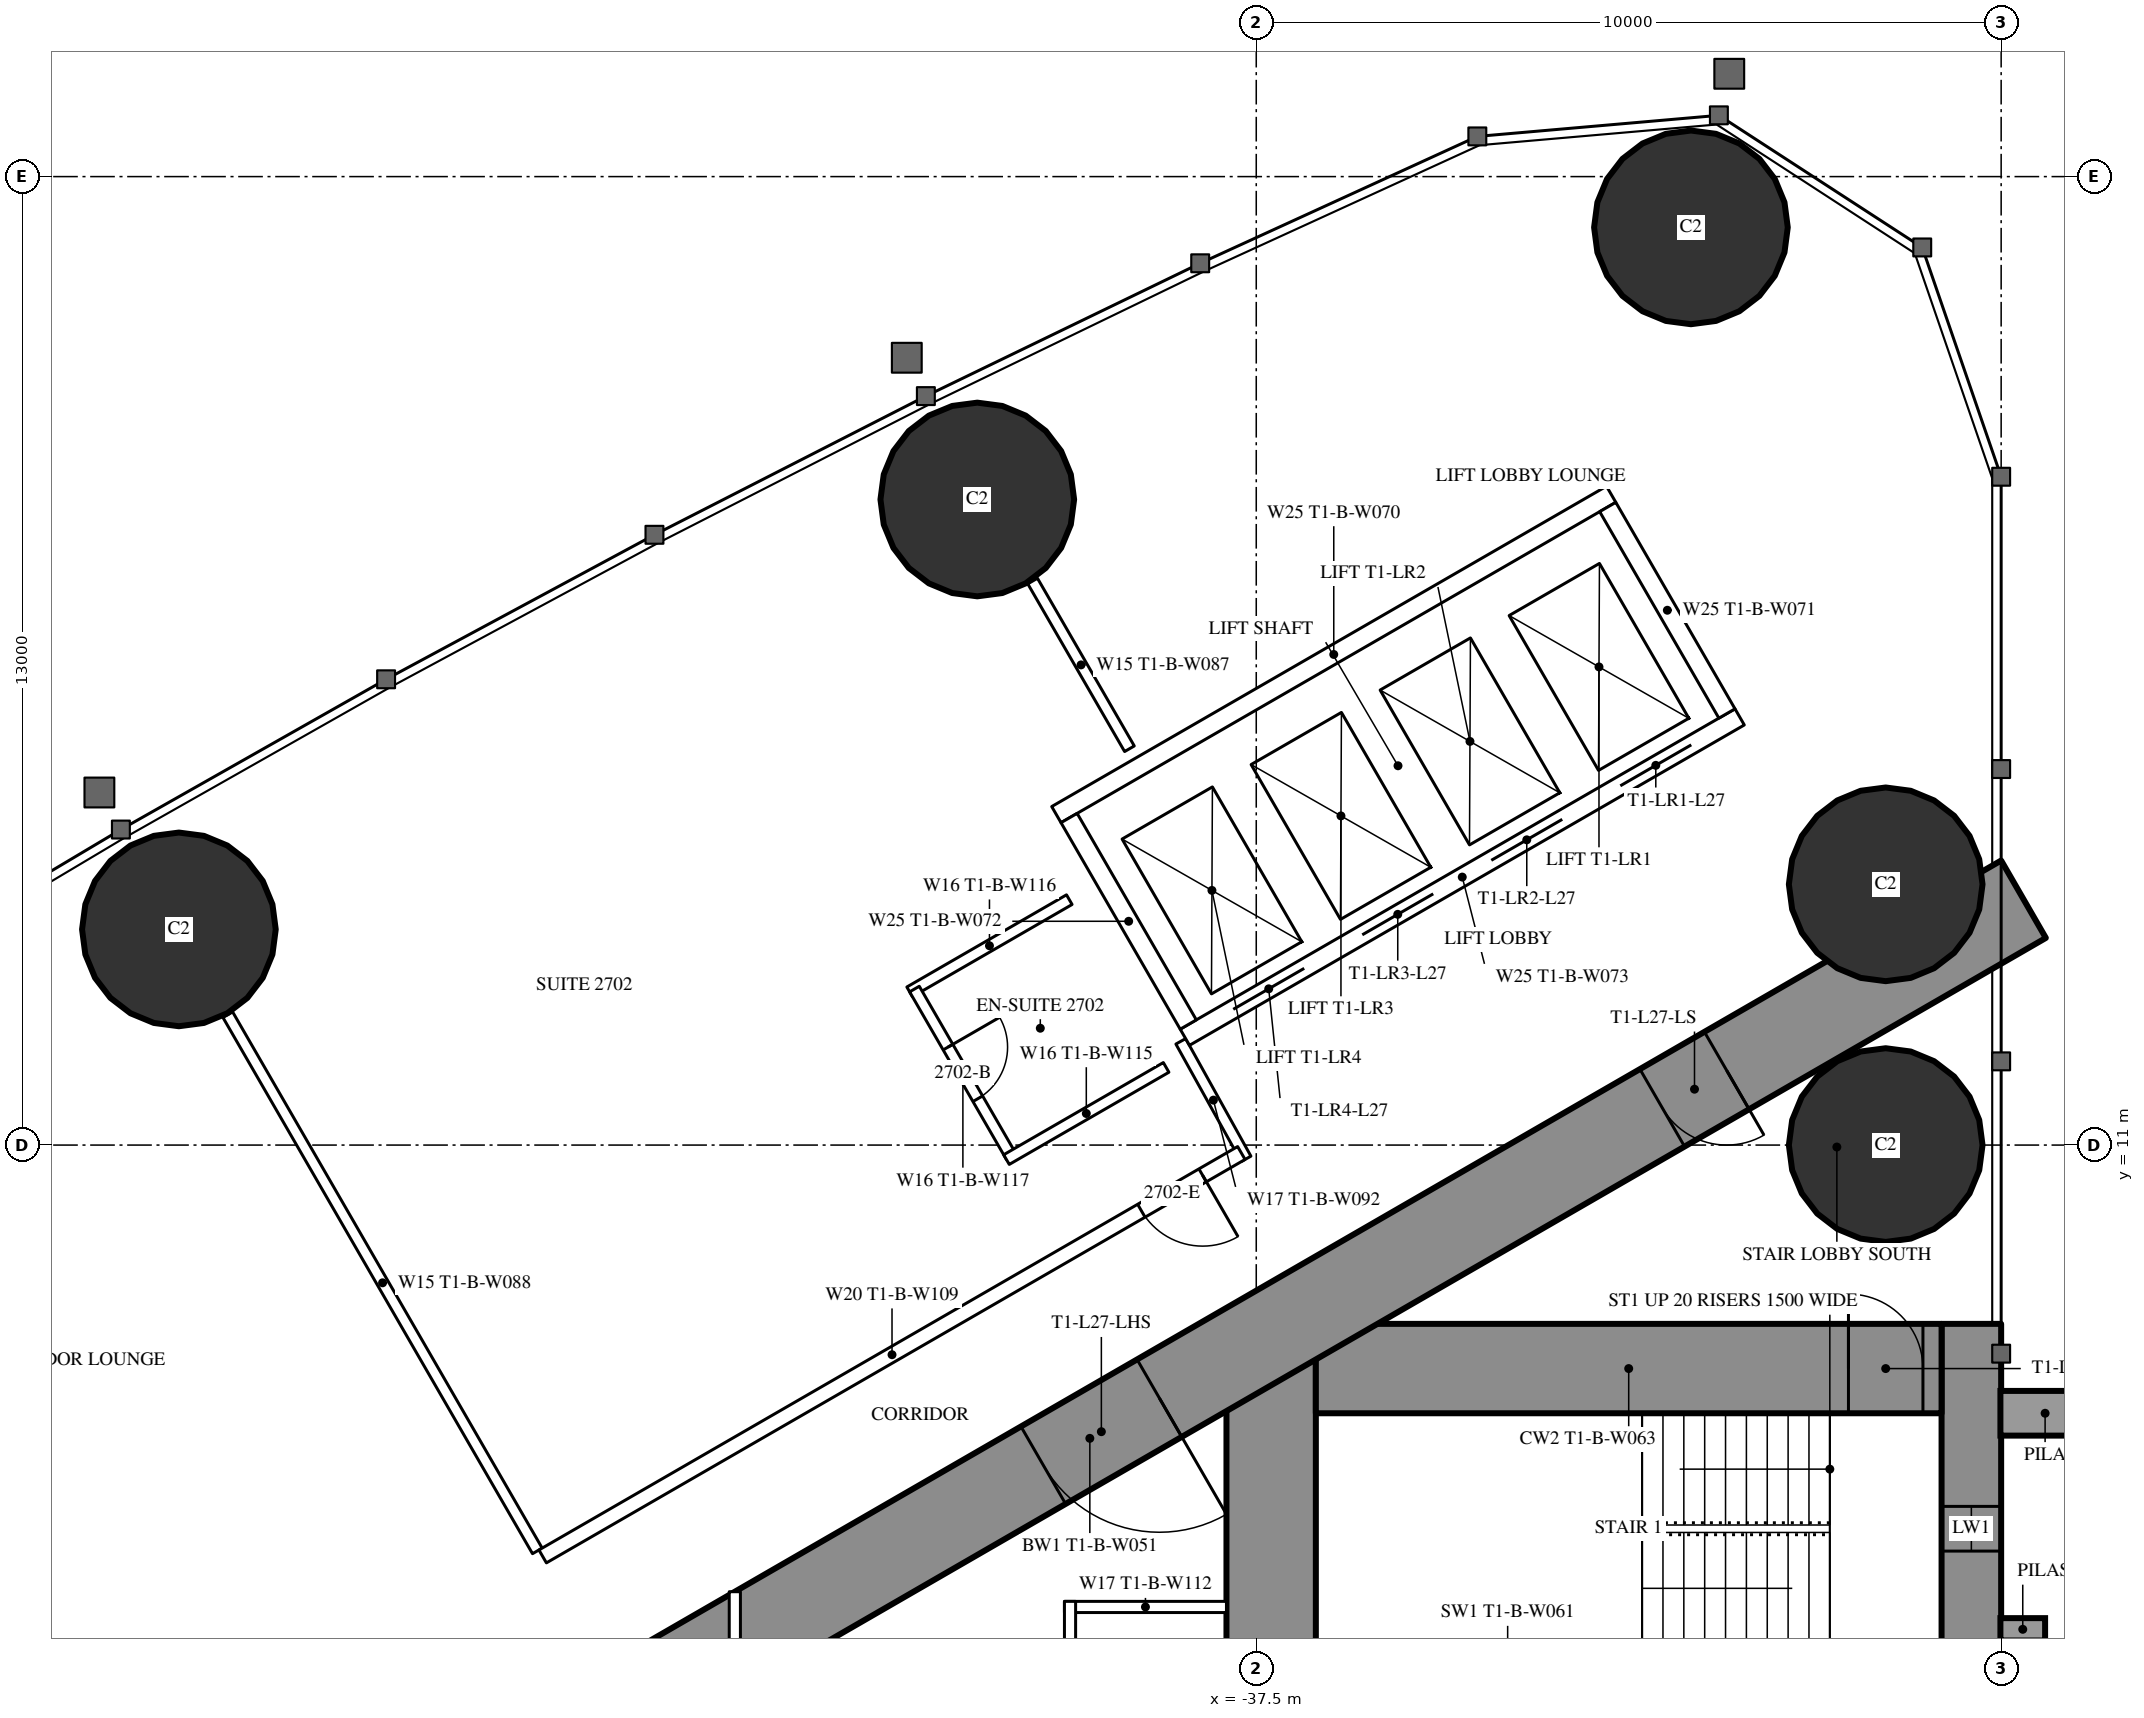
"""IFC4 building model, lengths in metres.
Left out: names, types, materials, properties, quantities, classifications, styles, units other than length and angle.
Written with IfcOpenShell. Run it as: python <this file> out.ifc"""

import sys

from ifc_helpers import new_model, si_unit, direction, frame, frame_2d, origin, origin_2d, place, context, subcontext, project, spatial, rectangle, hollow_circle, extrude, element, fill, save


model = new_model("IFC4")
c1 = context("Model", 3, precision=1e-05, world=origin(), true_north=direction((0.0, 1.0)))
c2 = subcontext(c1, "Body", "Model", "MODEL_VIEW")
j1 = project(units=[si_unit("LENGTHUNIT", "METRE"), si_unit("PLANEANGLEUNIT", "RADIAN")], contexts=[c1])
p1 = place(None, origin())
s1 = spatial("IfcSite", under=j1, at=p1, CompositionType="ELEMENT")
p2 = place(p1, origin())
s2 = spatial("IfcBuilding", under=s1, at=p2, CompositionType="ELEMENT")
p3 = place(p2, frame((0.0, 0.0, 104.6)))
s3 = spatial("IfcBuildingStorey", under=s2, at=p3, CompositionType="ELEMENT", Elevation=104.6)
for number, where, z_axis, x_axis in (
    (1, (-31.665, 23.318, 0.0), (0.0, 0.0, 1.0), (1.0, 0.0, 0.0)),
    (2, (-29.05, 11.0, 0.0), (0.0, 0.0, 1.0), (1.0, 0.0, 0.0)),
    (3, (-29.05, 14.5, 0.0), (0.0, 0.0, 1.0), (1.0, 0.0, 0.0)),
    (4, (-41.245, 19.666, 0.0), (0.0, 0.0, 1.0), (1.0, 0.0, 0.0)),
    (5, (-51.963, 13.895, 0.0), (0.0, 0.0, 1.0), (1.0, 0.0, 0.0)),
):
    element("IfcColumn", number, at=place(p3, frame(where, z_axis=z_axis, x_axis=x_axis)), inside=s3, PredefinedType="COLUMN", context=c2, shape_type="SweptSolid", body=[
        extrude(hollow_circle(Radius=1.3, WallThickness=0.1, at=origin_2d()), origin(), (0.0, 0.0, 1.0), 3.5),
    ])
p4 = place(p3, frame((-27.9, 8.6, 0.0), z_axis=(0.0, 0.0, 1.0), x_axis=(0.0, -1.0, 0.0)))
e6 = element("IfcWall", 6, at=p4, inside=s3, PredefinedType="SHEAR", context=c2, shape_type="SweptSolid", body=[
    extrude(rectangle(XDim=17.2, YDim=0.8, at=frame_2d((8.6, 0.0))), origin(), (0.0, 0.0, 1.0), 3.5),
])
p5 = place(p4, frame((2.45, 0.0, 0.6)))
e7 = element("IfcOpeningElement", 7, at=p5, cuts=e6, PredefinedType="OPENING", context=c2, shape_type="SweptSolid", body=[
    extrude(rectangle(XDim=0.6, YDim=2.1, at=frame_2d((0.3, 1.05))), frame((0.0, 0.41, 0.0), z_axis=(0.0, -1.0, 0.0), x_axis=(1.0, 0.0, 0.0)), (0.0, 0.0, 1.0), 0.82),
])
p6 = place(p4, frame((14.15, 0.0, 0.6)))
e8 = element("IfcOpeningElement", 8, at=p6, cuts=e6, PredefinedType="OPENING", context=c2, shape_type="SweptSolid", body=[
    extrude(rectangle(XDim=0.6, YDim=2.1, at=frame_2d((0.3, 1.05))), frame((0.0, 0.41, 0.0), z_axis=(0.0, -1.0, 0.0), x_axis=(1.0, 0.0, 0.0)), (0.0, 0.0, 1.0), 0.82),
])
p7 = place(p3, frame((-37.3, 8.6, 0.0), z_axis=(0.0, 0.0, 1.0), x_axis=(0.0, -1.0, 0.0)))
e9 = element("IfcWall", 9, at=p7, inside=s3, PredefinedType="SHEAR", context=c2, shape_type="SweptSolid", body=[
    extrude(rectangle(XDim=17.2, YDim=1.2, at=frame_2d((8.6, 0.0))), origin(), (0.0, 0.0, 1.0), 3.5),
])
p8 = place(p7, frame((7.7, 0.0, 0.0)))
e10 = element("IfcOpeningElement", 10, at=p8, cuts=e9, PredefinedType="OPENING", context=c2, shape_type="SweptSolid", body=[
    extrude(rectangle(XDim=1.8, YDim=2.2, at=frame_2d((0.9, 1.1))), frame((0.0, 0.61, 0.0), z_axis=(0.0, -1.0, 0.0), x_axis=(1.0, 0.0, 0.0)), (0.0, 0.0, 1.0), 1.22),
])
p9 = place(p3, frame((-28.3, 8.0, 0.0), z_axis=(0.0, 0.0, 1.0), x_axis=(-1.0, 0.0, 0.0)))
e11 = element("IfcWall", 11, at=p9, inside=s3, PredefinedType="SHEAR", context=c2, shape_type="SweptSolid", body=[
    extrude(rectangle(XDim=8.4, YDim=1.2, at=frame_2d((4.2, 0.0))), origin(), (0.0, 0.0, 1.0), 3.5),
])
p10 = place(p9, frame((0.25, 0.0, 0.0)))
e12 = element("IfcOpeningElement", 12, at=p10, cuts=e11, PredefinedType="OPENING", context=c2, shape_type="SweptSolid", body=[
    extrude(rectangle(XDim=1.0, YDim=2.2, at=frame_2d((0.5, 1.1))), frame((0.0, 0.61, 0.0), z_axis=(0.0, -1.0, 0.0), x_axis=(1.0, 0.0, 0.0)), (0.0, 0.0, 1.0), 1.22),
])
p11 = place(p3, frame((-27.2, 14.3, 0.0), z_axis=(0.0, 0.0, 1.0), x_axis=(-0.866026593062, -0.499997940104, 0.0)))
e13 = element("IfcWall", 13, at=p11, inside=s3, PredefinedType="SHEAR", context=c2, shape_type="SweptSolid", body=[
    extrude(rectangle(XDim=28.946, YDim=1.2, at=frame_2d((14.473, 0.0))), origin(), (0.0, 0.0, 1.0), 3.5),
])
p12 = place(p11, frame((4.6, 0.0, 0.0)))
e14 = element("IfcOpeningElement", 14, at=p12, cuts=e13, PredefinedType="OPENING", context=c2, shape_type="SweptSolid", body=[
    extrude(rectangle(XDim=1.0, YDim=2.2, at=frame_2d((0.5, 1.1))), frame((0.0, 0.61, 0.0), z_axis=(0.0, -1.0, 0.0), x_axis=(1.0, 0.0, 0.0)), (0.0, 0.0, 1.0), 1.22),
])
p13 = place(p11, frame((13.395, 0.0, 0.0)))
e15 = element("IfcOpeningElement", 15, at=p13, cuts=e13, PredefinedType="OPENING", context=c2, shape_type="SweptSolid", body=[
    extrude(rectangle(XDim=1.8, YDim=2.2, at=frame_2d((0.9, 1.1))), frame((0.0, 0.61, 0.0), z_axis=(0.0, -1.0, 0.0), x_axis=(1.0, 0.0, 0.0)), (0.0, 0.0, 1.0), 1.22),
])
p14 = place(p3, frame((-47.151, 5.552, 0.0), z_axis=(0.0, 0.0, 1.0), x_axis=(-0.500003012045, 0.866023664773, 0.0)))
e16 = element("IfcWall", 16, at=p14, inside=s3, PredefinedType="PARTITIONING", context=c2, shape_type="SweptSolid", body=[
    extrude(rectangle(XDim=8.311, YDim=0.15, at=frame_2d((4.156, 0.0))), origin(), (0.0, 0.0, 1.0), 2.2),
])
p15 = place(p3, frame((-39.202, 16.32, 0.0), z_axis=(0.0, 0.0, 1.0), x_axis=(-0.499947391036, 0.866055775454, 0.0)))
e17 = element("IfcWall", 17, at=p15, inside=s3, PredefinedType="PARTITIONING", context=c2, shape_type="SweptSolid", body=[
    extrude(rectangle(XDim=2.599, YDim=0.15, at=frame_2d((1.3, 0.0))), origin(), (0.0, 0.0, 1.0), 3.25),
])
p16 = place(p3, frame((-38.513, 12.392, 0.0), z_axis=(0.0, 0.0, 1.0), x_axis=(0.485585508183, -0.874189175317, 0.0)))
e18 = element("IfcWall", 18, at=p16, inside=s3, PredefinedType="PARTITIONING", context=c2, shape_type="SweptSolid", body=[
    extrude(rectangle(XDim=1.805, YDim=0.15, at=frame_2d((0.902, 0.0))), origin(), (0.0, 0.0, 1.0), 3.25),
])
p17 = place(p3, frame((-37.7, 10.894, 0.0), z_axis=(0.0, 0.0, 1.0), x_axis=(-0.866027551079, -0.499996280759, 0.0)))
e19 = element("IfcWall", 19, at=p17, inside=s3, PredefinedType="PARTITIONING", context=c2, shape_type="SweptSolid", body=[
    extrude(rectangle(XDim=10.831, YDim=0.2, at=frame_2d((5.415, 0.0))), origin(), (0.0, 0.0, 1.0), 3.25),
])
p18 = place(p17, frame((0.6, 0.0, 0.0)))
e20 = element("IfcOpeningElement", 20, at=p18, cuts=e19, PredefinedType="OPENING", context=c2, shape_type="SweptSolid", body=[
    extrude(rectangle(XDim=0.95, YDim=2.2, at=frame_2d((0.475, 1.1))), frame((0.0, 0.11, 0.0), z_axis=(0.0, -1.0, 0.0), x_axis=(1.0, 0.0, 0.0)), (0.0, 0.0, 1.0), 0.22),
])
p19 = place(p3, frame((-40.01, 14.294, 0.0), z_axis=(0.0, 0.0, 1.0), x_axis=(-0.866031185235, -0.4999899861, 0.0)))
e21 = element("IfcWall", 21, at=p19, inside=s3, PredefinedType="PARTITIONING", context=c2, shape_type="SweptSolid", body=[
    extrude(rectangle(XDim=2.475, YDim=0.15, at=frame_2d((1.238, 0.0))), origin(), (0.0, 0.0, 1.0), 3.25),
])
p20 = place(p3, frame((-40.788, 10.843, 0.0), z_axis=(0.0, 0.0, 1.0), x_axis=(-0.500006934395, 0.866021400173, 0.0)))
e22 = element("IfcWall", 22, at=p20, inside=s3, PredefinedType="PARTITIONING", context=c2, shape_type="SweptSolid", body=[
    extrude(rectangle(XDim=2.6, YDim=0.15, at=frame_2d((1.3, 0.0))), origin(), (0.0, 0.0, 1.0), 3.25),
])
p21 = place(p20, frame((0.9, 0.0, 0.0)))
e23 = element("IfcOpeningElement", 23, at=p21, cuts=e22, PredefinedType="OPENING", context=c2, shape_type="SweptSolid", body=[
    extrude(rectangle(XDim=0.8, YDim=2.2, at=frame_2d((0.4, 1.1))), frame((0.0, 0.085, 0.0), z_axis=(0.0, -1.0, 0.0), x_axis=(1.0, 0.0, 0.0)), (0.0, 0.0, 1.0), 0.17),
])
p22 = place(p3, frame((-38.71, 12.042, 0.0), z_axis=(0.0, 0.0, 1.0), x_axis=(-0.86604923931, -0.499958713387, 0.0)))
e24 = element("IfcWall", 24, at=p22, inside=s3, PredefinedType="PARTITIONING", context=c2, shape_type="SweptSolid", body=[
    extrude(rectangle(XDim=2.475, YDim=0.15, at=frame_2d((1.237, 0.0))), origin(), (0.0, 0.0, 1.0), 3.25),
])
p23 = place(p3, frame((-37.9, 4.8, 0.0), z_axis=(0.0, 0.0, 1.0), x_axis=(-1.0, 0.0, 0.0)))
e25 = element("IfcWall", 25, at=p23, inside=s3, PredefinedType="PARTITIONING", context=c2, shape_type="SweptSolid", body=[
    extrude(rectangle(XDim=2.175, YDim=0.15, at=frame_2d((1.087, 0.0))), origin(), (0.0, 0.0, 1.0), 3.25),
])
p24 = place(p3, frame((-40.0, 4.875, 0.0), z_axis=(0.0, 0.0, 1.0), x_axis=(0.0, -1.0, 0.0)))
e26 = element("IfcWall", 26, at=p24, inside=s3, PredefinedType="PARTITIONING", context=c2, shape_type="SweptSolid", body=[
    extrude(rectangle(XDim=3.75, YDim=0.15, at=frame_2d((1.875, 0.0))), origin(), (0.0, 0.0, 1.0), 3.25),
])
p25 = place(p24, frame((1.375, 0.0, 0.0)))
e27 = element("IfcOpeningElement", 27, at=p25, cuts=e26, PredefinedType="OPENING", context=c2, shape_type="SweptSolid", body=[
    extrude(rectangle(XDim=1.0, YDim=2.2, at=frame_2d((0.5, 1.1))), frame((0.0, 0.085, 0.0), z_axis=(0.0, -1.0, 0.0), x_axis=(1.0, 0.0, 0.0)), (0.0, 0.0, 1.0), 0.17),
])
p26 = place(p3, frame((-44.5, 5.005, 0.0), z_axis=(0.0, 0.0, 1.0), x_axis=(0.0, -1.0, 0.0)))
e28 = element("IfcWall", 28, at=p26, inside=s3, PredefinedType="PARTITIONING", context=c2, shape_type="SweptSolid", body=[
    extrude(rectangle(XDim=10.009, YDim=0.15, at=frame_2d((5.005, 0.0))), origin(), (0.0, 0.0, 1.0), 2.45),
])
p27 = place(p26, frame((4.505, 0.0, 0.0)))
e29 = element("IfcOpeningElement", 29, at=p27, cuts=e28, PredefinedType="OPENING", context=c2, shape_type="SweptSolid", body=[
    extrude(rectangle(XDim=1.0, YDim=2.2, at=frame_2d((0.5, 1.1))), frame((0.0, 0.085, 0.0), z_axis=(0.0, -1.0, 0.0), x_axis=(1.0, 0.0, 0.0)), (0.0, 0.0, 1.0), 0.17),
])
p28 = place(p3, frame((-31.01, 16.747, 0.0), z_axis=(0.0, 0.0, 1.0), x_axis=(-0.866028165386, -0.499995216735, 0.0)))
e30 = element("IfcWall", 30, at=p28, inside=s3, PredefinedType="PARTITIONING", context=c2, shape_type="SweptSolid", body=[
    extrude(rectangle(XDim=8.6, YDim=0.25, at=frame_2d((4.3, 0.0))), origin(), (0.0, 0.0, 1.0), 3.25),
])
p29 = place(p28, frame((0.75, 0.0, 0.0)))
e31 = element("IfcOpeningElement", 31, at=p29, cuts=e30, PredefinedType="OPENING", context=c2, shape_type="SweptSolid", body=[
    extrude(rectangle(XDim=1.1, YDim=2.2, at=frame_2d((0.55, 1.1))), frame((0.0, 0.135, 0.0), z_axis=(0.0, -1.0, 0.0), x_axis=(1.0, 0.0, 0.0)), (0.0, 0.0, 1.0), 0.27),
])
p30 = place(p28, frame((2.75, 0.0, 0.0)))
e32 = element("IfcOpeningElement", 32, at=p30, cuts=e30, PredefinedType="OPENING", context=c2, shape_type="SweptSolid", body=[
    extrude(rectangle(XDim=1.1, YDim=2.2, at=frame_2d((0.55, 1.1))), frame((0.0, 0.135, 0.0), z_axis=(0.0, -1.0, 0.0), x_axis=(1.0, 0.0, 0.0)), (0.0, 0.0, 1.0), 0.27),
])
p31 = place(p28, frame((4.75, 0.0, 0.0)))
e33 = element("IfcOpeningElement", 33, at=p31, cuts=e30, PredefinedType="OPENING", context=c2, shape_type="SweptSolid", body=[
    extrude(rectangle(XDim=1.1, YDim=2.2, at=frame_2d((0.55, 1.1))), frame((0.0, 0.135, 0.0), z_axis=(0.0, -1.0, 0.0), x_axis=(1.0, 0.0, 0.0)), (0.0, 0.0, 1.0), 0.27),
])
p32 = place(p28, frame((6.75, 0.0, 0.0)))
e34 = element("IfcOpeningElement", 34, at=p32, cuts=e30, PredefinedType="OPENING", context=c2, shape_type="SweptSolid", body=[
    extrude(rectangle(XDim=1.1, YDim=2.2, at=frame_2d((0.55, 1.1))), frame((0.0, 0.135, 0.0), z_axis=(0.0, -1.0, 0.0), x_axis=(1.0, 0.0, 0.0)), (0.0, 0.0, 1.0), 0.27),
])
p33 = place(p3, frame((-32.736, 19.736, 0.0), z_axis=(0.0, 0.0, 1.0), x_axis=(-0.866028165386, -0.499995216735, 0.0)))
e35 = element("IfcWall", 35, at=p33, inside=s3, PredefinedType="PARTITIONING", context=c2, shape_type="SweptSolid", body=[
    extrude(rectangle(XDim=8.6, YDim=0.25, at=frame_2d((4.3, 0.0))), origin(), (0.0, 0.0, 1.0), 3.25),
])
p34 = place(p3, frame((-31.181, 16.793, 0.0), z_axis=(0.0, 0.0, 1.0), x_axis=(-0.499929347863, 0.866066190972, 0.0)))
e36 = element("IfcWall", 36, at=p34, inside=s3, PredefinedType="PARTITIONING", context=c2, shape_type="SweptSolid", body=[
    extrude(rectangle(XDim=3.201, YDim=0.25, at=frame_2d((1.6, 0.0))), origin(), (0.0, 0.0, 1.0), 3.25),
])
p35 = place(p3, frame((-38.413, 12.618, 0.0), z_axis=(0.0, 0.0, 1.0), x_axis=(-0.499872130319, 0.866099216793, 0.0)))
e37 = element("IfcWall", 37, at=p35, inside=s3, PredefinedType="PARTITIONING", context=c2, shape_type="SweptSolid", body=[
    extrude(rectangle(XDim=3.2, YDim=0.25, at=frame_2d((1.6, 0.0))), origin(), (0.0, 0.0, 1.0), 3.25),
])
p36 = place(p21, origin())
e38 = element("IfcDoor", 38, at=p36, inside=s3, OperationType="SINGLE_SWING_RIGHT", PredefinedType="DOOR", context=c2, shape_type="SweptSolid", body=[
    extrude(rectangle(XDim=0.8, YDim=2.2, at=frame_2d((0.4, 1.1))), frame((0.0, 0.025, 0.0), z_axis=(0.0, -1.0, 0.0), x_axis=(1.0, 0.0, 0.0)), (0.0, 0.0, 1.0), 0.05),
])
fill(e23, e38)
p37 = place(p18, origin())
e39 = element("IfcDoor", 39, at=p37, inside=s3, OperationType="SINGLE_SWING_LEFT", PredefinedType="DOOR", context=c2, shape_type="SweptSolid", body=[
    extrude(rectangle(XDim=0.95, YDim=2.2, at=frame_2d((0.475, 1.1))), frame((0.0, 0.025, 0.0), z_axis=(0.0, -1.0, 0.0), x_axis=(1.0, 0.0, 0.0)), (0.0, 0.0, 1.0), 0.05),
])
fill(e20, e39)
p38 = place(p12, origin())
e40 = element("IfcDoor", 40, at=p38, inside=s3, OperationType="SINGLE_SWING_LEFT", PredefinedType="DOOR", context=c2, shape_type="SweptSolid", body=[
    extrude(rectangle(XDim=1.0, YDim=2.2, at=frame_2d((0.5, 1.1))), frame((0.0, 0.025, 0.0), z_axis=(0.0, -1.0, 0.0), x_axis=(1.0, 0.0, 0.0)), (0.0, 0.0, 1.0), 0.05),
])
fill(e14, e40)
p39 = place(p13, origin())
e41 = element("IfcDoor", 41, at=p39, inside=s3, OperationType="DOUBLE_DOOR_SINGLE_SWING", PredefinedType="DOOR", context=c2, shape_type="SweptSolid", body=[
    extrude(rectangle(XDim=1.8, YDim=2.2, at=frame_2d((0.9, 1.1))), frame((0.0, 0.025, 0.0), z_axis=(0.0, -1.0, 0.0), x_axis=(1.0, 0.0, 0.0)), (0.0, 0.0, 1.0), 0.05),
])
fill(e15, e41)
p40 = place(p10, origin())
e42 = element("IfcDoor", 42, at=p40, inside=s3, OperationType="SINGLE_SWING_RIGHT", PredefinedType="DOOR", context=c2, shape_type="SweptSolid", body=[
    extrude(rectangle(XDim=1.0, YDim=2.2, at=frame_2d((0.5, 1.1))), frame((0.0, 0.025, 0.0), z_axis=(0.0, -1.0, 0.0), x_axis=(1.0, 0.0, 0.0)), (0.0, 0.0, 1.0), 0.05),
])
fill(e12, e42)
p41 = place(p29, origin())
e43 = element("IfcDoor", 43, at=p41, inside=s3, OperationType="DOUBLE_DOOR_SLIDING", PredefinedType="USERDEFINED", context=c2, shape_type="SweptSolid", body=[
    extrude(rectangle(XDim=1.1, YDim=2.2, at=frame_2d((0.55, 1.1))), frame((0.0, 0.025, 0.0), z_axis=(0.0, -1.0, 0.0), x_axis=(1.0, 0.0, 0.0)), (0.0, 0.0, 1.0), 0.05),
])
fill(e31, e43)
p42 = place(p30, origin())
e44 = element("IfcDoor", 44, at=p42, inside=s3, OperationType="DOUBLE_DOOR_SLIDING", PredefinedType="USERDEFINED", context=c2, shape_type="SweptSolid", body=[
    extrude(rectangle(XDim=1.1, YDim=2.2, at=frame_2d((0.55, 1.1))), frame((0.0, 0.025, 0.0), z_axis=(0.0, -1.0, 0.0), x_axis=(1.0, 0.0, 0.0)), (0.0, 0.0, 1.0), 0.05),
])
fill(e32, e44)
p43 = place(p31, origin())
e45 = element("IfcDoor", 45, at=p43, inside=s3, OperationType="DOUBLE_DOOR_SLIDING", PredefinedType="USERDEFINED", context=c2, shape_type="SweptSolid", body=[
    extrude(rectangle(XDim=1.1, YDim=2.2, at=frame_2d((0.55, 1.1))), frame((0.0, 0.025, 0.0), z_axis=(0.0, -1.0, 0.0), x_axis=(1.0, 0.0, 0.0)), (0.0, 0.0, 1.0), 0.05),
])
fill(e33, e45)
p44 = place(p32, origin())
e46 = element("IfcDoor", 46, at=p44, inside=s3, OperationType="DOUBLE_DOOR_SLIDING", PredefinedType="USERDEFINED", context=c2, shape_type="SweptSolid", body=[
    extrude(rectangle(XDim=1.1, YDim=2.2, at=frame_2d((0.55, 1.1))), frame((0.0, 0.025, 0.0), z_axis=(0.0, -1.0, 0.0), x_axis=(1.0, 0.0, 0.0)), (0.0, 0.0, 1.0), 0.05),
])
fill(e34, e46)
p45 = place(p5, origin())
e47 = element("IfcWindow", 47, at=p45, inside=s3, PartitioningType="SINGLE_PANEL", PredefinedType="WINDOW", context=c2, shape_type="SweptSolid", body=[
    extrude(rectangle(XDim=0.6, YDim=2.1, at=frame_2d((0.3, 1.05))), frame((0.0, 0.03, 0.0), z_axis=(0.0, -1.0, 0.0), x_axis=(1.0, 0.0, 0.0)), (0.0, 0.0, 1.0), 0.06),
])
fill(e7, e47)
save(model, sys.argv[1])
